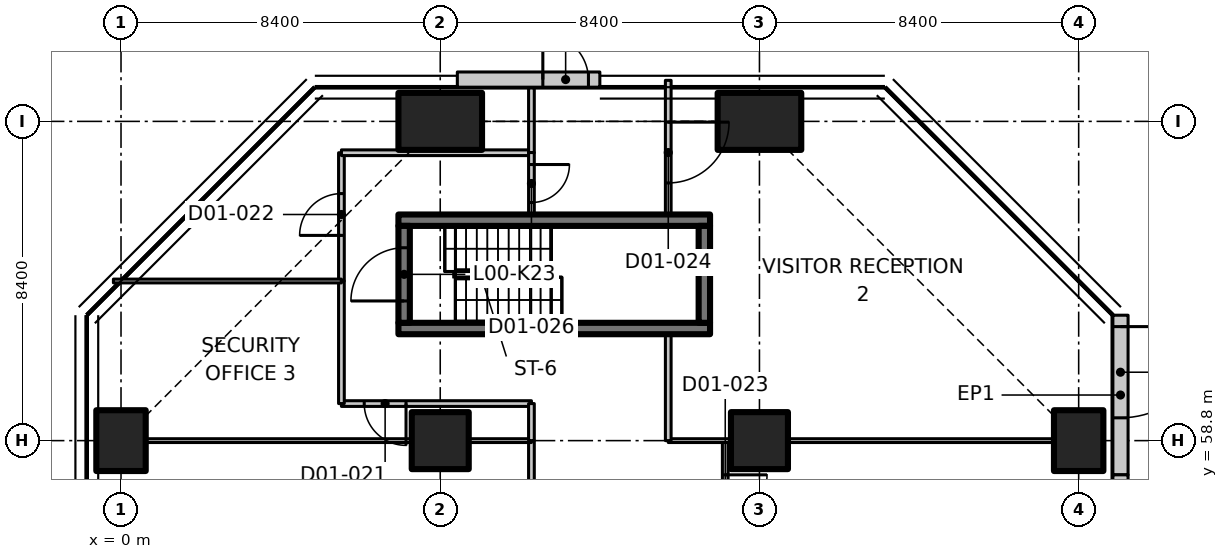
"""IFC4 building model, lengths in metres.
Left out: names, types, materials, properties, quantities, classifications, styles, units other than length and angle.
Written with IfcOpenShell. Run it as: python <this file> out.ifc"""

import sys

from ifc_helpers import new_model, si_unit, direction, frame, frame_2d, origin, origin_2d, place, context, subcontext, project, spatial, polyline, rectangle, outline, extrude, element, fill, save


model = new_model("IFC4")
c1 = context("Model", 3, precision=1e-05, world=origin(), true_north=direction((0.0, 1.0)))
c2 = subcontext(c1, "Body", "Model", "MODEL_VIEW")
j1 = project(units=[si_unit("LENGTHUNIT", "METRE"), si_unit("PLANEANGLEUNIT", "RADIAN")], contexts=[c1])
p1 = place(None, origin())
s1 = spatial("IfcSite", under=j1, at=p1, CompositionType="ELEMENT")
p2 = place(p1, origin())
s2 = spatial("IfcBuilding", under=s1, at=p2, CompositionType="ELEMENT")
p3 = place(p2, origin())
s3 = spatial("IfcBuildingStorey", under=s2, at=p3, CompositionType="ELEMENT", Elevation=0.0)
p4 = place(p3, frame((0.0, 58.8, 0.0), z_axis=(0.0, 0.0, 1.0), x_axis=(1.0, 0.0, 0.0)))
e1 = element("IfcColumn", 1, at=p4, inside=s3, PredefinedType="COLUMN", context=c2, shape_type="SweptSolid", body=[
    extrude(rectangle(XDim=1.3, YDim=1.6, at=origin_2d()), origin(), (0.0, 0.0, 1.0), 6.75),
])
p5 = place(p3, frame((8.4, 58.8, 0.0), z_axis=(0.0, 0.0, 1.0), x_axis=(1.0, 0.0, 0.0)))
e2 = element("IfcColumn", 2, at=p5, inside=s3, PredefinedType="COLUMN", context=c2, shape_type="SweptSolid", body=[
    extrude(rectangle(XDim=1.5, YDim=1.5, at=origin_2d()), origin(), (0.0, 0.0, 1.0), 6.75),
])
p6 = place(p3, frame((8.4, 67.2, 0.0), z_axis=(0.0, 0.0, 1.0), x_axis=(0.0, 1.0, 0.0)))
e3 = element("IfcColumn", 3, at=p6, inside=s3, PredefinedType="COLUMN", context=c2, shape_type="SweptSolid", body=[
    extrude(rectangle(XDim=1.5, YDim=2.2, at=origin_2d()), origin(), (0.0, 0.0, 1.0), 6.75),
])
p7 = place(p3, frame((16.8, 58.8, 0.0), z_axis=(0.0, 0.0, 1.0), x_axis=(1.0, 0.0, 0.0)))
e4 = element("IfcColumn", 4, at=p7, inside=s3, PredefinedType="COLUMN", context=c2, shape_type="SweptSolid", body=[
    extrude(rectangle(XDim=1.5, YDim=1.5, at=origin_2d()), origin(), (0.0, 0.0, 1.0), 6.75),
])
p8 = place(p3, frame((16.8, 67.2, 0.0), z_axis=(0.0, 0.0, 1.0), x_axis=(0.0, 1.0, 0.0)))
e5 = element("IfcColumn", 5, at=p8, inside=s3, PredefinedType="COLUMN", context=c2, shape_type="SweptSolid", body=[
    extrude(rectangle(XDim=1.5, YDim=2.2, at=origin_2d()), origin(), (0.0, 0.0, 1.0), 6.75),
])
p9 = place(p3, frame((25.2, 58.8, 0.0), z_axis=(0.0, 0.0, 1.0), x_axis=(1.0, 0.0, 0.0)))
e6 = element("IfcColumn", 6, at=p9, inside=s3, PredefinedType="COLUMN", context=c2, shape_type="SweptSolid", body=[
    extrude(rectangle(XDim=1.3, YDim=1.6, at=origin_2d()), origin(), (0.0, 0.0, 1.0), 6.75),
])
p10 = place(p3, frame((26.3, 62.1, 0.0), z_axis=(0.0, 0.0, 1.0), x_axis=(0.0, -1.0, 0.0)))
e7 = element("IfcWall", 7, at=p10, inside=s3, PredefinedType="SOLIDWALL", context=c2, shape_type="SweptSolid", body=[
    extrude(rectangle(XDim=4.2, YDim=0.4, at=frame_2d((2.1, 0.0))), origin(), (0.0, 0.0, 1.0), 6.75),
])
p11 = place(p10, frame((0.3, 0.0, 0.0)))
e8 = element("IfcOpeningElement", 8, at=p11, cuts=e7, PredefinedType="OPENING", context=c2, shape_type="SweptSolid", body=[
    extrude(rectangle(XDim=2.4, YDim=2.7, at=frame_2d((1.2, 1.35))), frame((0.0, 0.21, 0.0), z_axis=(0.0, -1.0, 0.0), x_axis=(1.0, 0.0, 0.0)), (0.0, 0.0, 1.0), 0.42),
])
p12 = place(p3, frame((26.3, 57.9, 0.0), z_axis=(0.0, 0.0, 1.0), x_axis=(0.0, -1.0, 0.0)))
e9 = element("IfcWall", 9, at=p12, inside=s3, PredefinedType="SOLIDWALL", context=c2, shape_type="SweptSolid", body=[
    extrude(rectangle(XDim=4.2, YDim=0.4, at=frame_2d((2.1, 0.0))), origin(), (0.0, 0.0, 1.0), 6.75),
])
p13 = place(p12, frame((2.7, 0.0, 0.0)))
e10 = element("IfcOpeningElement", 10, at=p13, cuts=e9, PredefinedType="OPENING", context=c2, shape_type="SweptSolid", body=[
    extrude(rectangle(XDim=1.2, YDim=2.4, at=frame_2d((0.6, 1.2))), frame((0.0, 0.21, 0.0), z_axis=(0.0, -1.0, 0.0), x_axis=(1.0, 0.0, 0.0)), (0.0, 0.0, 1.0), 0.42),
])
p14 = place(p3, frame((8.85, 68.3, 0.0), z_axis=(0.0, 0.0, 1.0), x_axis=(1.0, 0.0, 0.0)))
e11 = element("IfcWall", 11, at=p14, inside=s3, PredefinedType="SOLIDWALL", context=c2, shape_type="SweptSolid", body=[
    extrude(rectangle(XDim=3.75, YDim=0.4, at=frame_2d((1.875, 0.0))), origin(), (0.0, 0.0, 1.0), 6.75),
])
p15 = place(p14, frame((2.25, 0.0, 0.0)))
e12 = element("IfcOpeningElement", 12, at=p15, cuts=e11, PredefinedType="OPENING", context=c2, shape_type="SweptSolid", body=[
    extrude(rectangle(XDim=1.2, YDim=2.4, at=frame_2d((0.6, 1.2))), frame((0.0, 0.21, 0.0), z_axis=(0.0, -1.0, 0.0), x_axis=(1.0, 0.0, 0.0)), (0.0, 0.0, 1.0), 0.42),
])
for number, where, z_axis, x_axis in (
    (13, (7.3, 61.75, 0.0), (0.0, 0.0, 1.0), (1.0, 0.0, 0.0)),
    (14, (7.3, 64.6, 0.0), (0.0, 0.0, 1.0), (1.0, 0.0, 0.0)),
):
    element("IfcWall", number, at=place(p3, frame(where, z_axis=z_axis, x_axis=x_axis)), inside=s3, PredefinedType="SHEAR", context=c2, shape_type="SweptSolid", body=[
        extrude(rectangle(XDim=8.2, YDim=0.3, at=frame_2d((4.1, 0.0))), origin(), (0.0, 0.0, 1.0), 6.75),
    ])
p16 = place(p3, frame((7.45, 61.9, 0.0), z_axis=(0.0, 0.0, 1.0), x_axis=(0.0, 1.0, 0.0)))
e15 = element("IfcWall", 15, at=p16, inside=s3, PredefinedType="SHEAR", context=c2, shape_type="SweptSolid", body=[
    extrude(rectangle(XDim=2.55, YDim=0.3, at=frame_2d((1.275, 0.0))), origin(), (0.0, 0.0, 1.0), 6.75),
])
p17 = place(p16, frame((0.575, 0.0, 0.0)))
e16 = element("IfcOpeningElement", 16, at=p17, cuts=e15, PredefinedType="OPENING", context=c2, shape_type="SweptSolid", body=[
    extrude(rectangle(XDim=1.4, YDim=2.1, at=frame_2d((0.7, 1.05))), frame((0.0, 0.16, 0.0), z_axis=(0.0, -1.0, 0.0), x_axis=(1.0, 0.0, 0.0)), (0.0, 0.0, 1.0), 0.32),
])
p18 = place(p3, frame((15.35, 61.9, 0.0), z_axis=(0.0, 0.0, 1.0), x_axis=(0.0, 1.0, 0.0)))
e17 = element("IfcWall", 17, at=p18, inside=s3, PredefinedType="SHEAR", context=c2, shape_type="SweptSolid", body=[
    extrude(rectangle(XDim=2.55, YDim=0.3, at=frame_2d((1.275, 0.0))), origin(), (0.0, 0.0, 1.0), 6.75),
])
p19 = place(p3, frame((10.8, 56.3, 0.0), z_axis=(0.0, 0.0, 1.0), x_axis=(0.0, 1.0, 0.0)))
e18 = element("IfcWall", 18, at=p19, inside=s3, PredefinedType="PARTITIONING", context=c2, shape_type="SweptSolid", body=[
    extrude(rectangle(XDim=2.5, YDim=0.15, at=frame_2d((1.25, 0.0))), origin(), (0.0, 0.0, 1.0), 6.73),
])
p20 = place(p3, frame((15.9, 58.8, 0.0), z_axis=(0.0, 0.0, 1.0), x_axis=(0.0, -1.0, 0.0)))
e19 = element("IfcWall", 19, at=p20, inside=s3, PredefinedType="PARTITIONING", context=c2, shape_type="SweptSolid", body=[
    extrude(rectangle(XDim=2.65, YDim=0.15, at=frame_2d((1.325, 0.0))), origin(), (0.0, 0.0, 1.0), 6.73),
])
p21 = place(p20, frame((0.9, 0.0, 0.0)))
e20 = element("IfcOpeningElement", 20, at=p21, cuts=e19, PredefinedType="OPENING", context=c2, shape_type="SweptSolid", body=[
    extrude(rectangle(XDim=1.1, YDim=2.1, at=frame_2d((0.55, 1.05))), frame((0.0, 0.085, 0.0), z_axis=(0.0, -1.0, 0.0), x_axis=(1.0, 0.0, 0.0)), (0.0, 0.0, 1.0), 0.17),
])
p22 = place(p3, frame((10.8, 59.775, 0.0), z_axis=(0.0, 0.0, 1.0), x_axis=(-1.0, 0.0, 0.0)))
e21 = element("IfcWall", 21, at=p22, inside=s3, PredefinedType="PARTITIONING", context=c2, shape_type="SweptSolid", body=[
    extrude(rectangle(XDim=5.0, YDim=0.15, at=frame_2d((2.5, 0.0))), origin(), (0.0, 0.0, 1.0), 6.73),
])
p23 = place(p22, frame((3.3, 0.0, 0.0)))
e22 = element("IfcOpeningElement", 22, at=p23, cuts=e21, PredefinedType="OPENING", context=c2, shape_type="SweptSolid", body=[
    extrude(rectangle(XDim=1.1, YDim=2.1, at=frame_2d((0.55, 1.05))), frame((0.0, 0.085, 0.0), z_axis=(0.0, -1.0, 0.0), x_axis=(1.0, 0.0, 0.0)), (0.0, 0.0, 1.0), 0.17),
])
p24 = place(p3, frame((5.8, 59.775, 0.0), z_axis=(0.0, 0.0, 1.0), x_axis=(0.0, 1.0, 0.0)))
e23 = element("IfcWall", 23, at=p24, inside=s3, PredefinedType="PARTITIONING", context=c2, shape_type="SweptSolid", body=[
    extrude(rectangle(XDim=3.225, YDim=0.15, at=frame_2d((1.613, 0.0))), origin(), (0.0, 0.0, 1.0), 6.73),
])
p25 = place(p3, frame((5.8, 63.0, 0.0), z_axis=(0.0, 0.0, 1.0), x_axis=(0.0, 1.0, 0.0)))
e24 = element("IfcWall", 24, at=p25, inside=s3, PredefinedType="PARTITIONING", context=c2, shape_type="SweptSolid", body=[
    extrude(rectangle(XDim=3.375, YDim=0.15, at=frame_2d((1.688, 0.0))), origin(), (0.0, 0.0, 1.0), 6.38),
])
p26 = place(p25, frame((1.2, 0.0, 0.0)))
e25 = element("IfcOpeningElement", 25, at=p26, cuts=e24, PredefinedType="OPENING", context=c2, shape_type="SweptSolid", body=[
    extrude(rectangle(XDim=1.1, YDim=2.1, at=frame_2d((0.55, 1.05))), frame((0.0, 0.085, 0.0), z_axis=(0.0, -1.0, 0.0), x_axis=(1.0, 0.0, 0.0)), (0.0, 0.0, 1.0), 0.17),
])
p27 = place(p3, frame((5.8, 66.375, 0.0), z_axis=(0.0, 0.0, 1.0), x_axis=(1.0, 0.0, 0.0)))
e26 = element("IfcWall", 26, at=p27, inside=s3, PredefinedType="PARTITIONING", context=c2, shape_type="SweptSolid", body=[
    extrude(outline(polyline([(0.0, 0.0), (5.0, 0.0), (5.0, 6.73), (2.466, 6.73), (2.464, 6.38), (1.086, 6.38), (1.084, 6.73), (0.0, 6.73), (0.0, 0.0)])), frame((0.0, 0.075, 0.0), z_axis=(0.0, -1.0, 0.0), x_axis=(1.0, 0.0, 0.0)), (0.0, 0.0, 1.0), 0.15),
])
p28 = place(p3, frame((10.8, 66.375, 0.0), z_axis=(0.0, 0.0, 1.0), x_axis=(0.0, 1.0, 0.0)))
e27 = element("IfcWall", 27, at=p28, inside=s3, PredefinedType="PARTITIONING", context=c2, shape_type="SweptSolid", body=[
    extrude(rectangle(XDim=1.705, YDim=0.15, at=frame_2d((0.853, 0.0))), origin(), (0.0, 0.0, 1.0), 6.38),
])
p29 = place(p3, frame((14.4, 68.28, 0.0), z_axis=(0.0, 0.0, 1.0), x_axis=(0.0, -1.0, 0.0)))
e28 = element("IfcWall", 28, at=p29, inside=s3, PredefinedType="PARTITIONING", context=c2, shape_type="SweptSolid", body=[
    extrude(rectangle(XDim=3.53, YDim=0.15, at=frame_2d((1.765, 0.0))), origin(), (0.0, 0.0, 1.0), 6.38),
])
p30 = place(p29, frame((1.1, 0.0, 0.0)))
e29 = element("IfcOpeningElement", 29, at=p30, cuts=e28, PredefinedType="OPENING", context=c2, shape_type="SweptSolid", body=[
    extrude(rectangle(XDim=1.6, YDim=2.1, at=frame_2d((0.8, 1.05))), frame((0.0, 0.085, 0.0), z_axis=(0.0, -1.0, 0.0), x_axis=(1.0, 0.0, 0.0)), (0.0, 0.0, 1.0), 0.17),
])
p31 = place(p3, frame((0.67, 58.8, 0.0), z_axis=(0.0, 0.0, 1.0), x_axis=(1.0, 0.0, 0.0)))
e30 = element("IfcWall", 30, at=p31, inside=s3, PredefinedType="PARTITIONING", context=c2, shape_type="SweptSolid", body=[
    extrude(rectangle(XDim=6.96, YDim=0.1, at=frame_2d((3.48, 0.0))), origin(), (0.0, 0.0, 1.0), 6.73),
])
p32 = place(p3, frame((9.17, 58.8, 0.0), z_axis=(0.0, 0.0, 1.0), x_axis=(1.0, 0.0, 0.0)))
e31 = element("IfcWall", 31, at=p32, inside=s3, PredefinedType="PARTITIONING", context=c2, shape_type="SweptSolid", body=[
    extrude(rectangle(XDim=1.63, YDim=0.1, at=frame_2d((0.815, 0.0))), origin(), (0.0, 0.0, 1.0), 6.73),
])
p33 = place(p3, frame((-0.2, 63.0, 0.0), z_axis=(0.0, 0.0, 1.0), x_axis=(1.0, 0.0, 0.0)))
e32 = element("IfcWall", 32, at=p33, inside=s3, PredefinedType="PARTITIONING", context=c2, shape_type="SweptSolid", body=[
    extrude(outline(polyline([(0.0, 0.0), (6.0, 0.0), (6.0, 6.73), (5.066, 6.73), (5.064, 6.38), (3.736, 6.38), (3.734, 6.73), (0.0, 6.73), (0.0, 0.0)])), frame((0.0, 0.05, 0.0), z_axis=(0.0, -1.0, 0.0), x_axis=(1.0, 0.0, 0.0)), (0.0, 0.0, 1.0), 0.1),
])
p34 = place(p3, frame((10.8, 59.775, 0.0), z_axis=(0.0, 0.0, 1.0), x_axis=(0.0, -1.0, 0.0)))
e33 = element("IfcWall", 33, at=p34, inside=s3, PredefinedType="PARTITIONING", context=c2, shape_type="SweptSolid", body=[
    extrude(rectangle(XDim=0.975, YDim=0.15, at=frame_2d((0.487, 0.0))), origin(), (0.0, 0.0, 1.0), 6.73),
])
p35 = place(p3, frame((14.4, 58.8, 0.0), z_axis=(0.0, 0.0, 1.0), x_axis=(1.0, 0.0, 0.0)))
e34 = element("IfcWall", 34, at=p35, inside=s3, PredefinedType="PARTITIONING", context=c2, shape_type="SweptSolid", body=[
    extrude(rectangle(XDim=1.63, YDim=0.1, at=frame_2d((0.815, 0.0))), origin(), (0.0, 0.0, 1.0), 6.73),
])
p36 = place(p3, frame((17.57, 58.8, 0.0), z_axis=(0.0, 0.0, 1.0), x_axis=(1.0, 0.0, 0.0)))
e35 = element("IfcWall", 35, at=p36, inside=s3, PredefinedType="PARTITIONING", context=c2, shape_type="SweptSolid", body=[
    extrude(rectangle(XDim=6.96, YDim=0.1, at=frame_2d((3.48, 0.0))), origin(), (0.0, 0.0, 1.0), 6.73),
])
p37 = place(p3, frame((14.4, 58.8, 0.0), z_axis=(0.0, 0.0, 1.0), x_axis=(0.0, 1.0, 0.0)))
e36 = element("IfcWall", 36, at=p37, inside=s3, PredefinedType="PARTITIONING", context=c2, shape_type="SweptSolid", body=[
    extrude(rectangle(XDim=2.8, YDim=0.15, at=frame_2d((1.4, 0.0))), origin(), (0.0, 0.0, 1.0), 6.73),
])
p38 = place(p3, frame((10.8, 66.38, 0.0), z_axis=(0.0, 0.0, 1.0), x_axis=(0.0, -1.0, 0.0)))
e37 = element("IfcWall", 37, at=p38, inside=s3, PredefinedType="PARTITIONING", context=c2, shape_type="SweptSolid", body=[
    extrude(rectangle(XDim=1.63, YDim=0.15, at=frame_2d((0.815, 0.0))), origin(), (0.0, 0.0, 1.0), 6.73),
])
p39 = place(p38, frame((0.315, 0.0, 0.0)))
e38 = element("IfcOpeningElement", 38, at=p39, cuts=e37, PredefinedType="OPENING", context=c2, shape_type="SweptSolid", body=[
    extrude(rectangle(XDim=1.0, YDim=2.1, at=frame_2d((0.5, 1.05))), frame((0.0, 0.085, 0.0), z_axis=(0.0, -1.0, 0.0), x_axis=(1.0, 0.0, 0.0)), (0.0, 0.0, 1.0), 0.17),
])
p40 = place(p11, origin())
e39 = element("IfcDoor", 39, at=p40, inside=s3, OperationType="DOUBLE_DOOR_SINGLE_SWING", PredefinedType="DOOR", context=c2, shape_type="SweptSolid", body=[
    extrude(rectangle(XDim=2.4, YDim=2.7, at=frame_2d((1.2, 1.35))), frame((0.0, 0.025, 0.0), z_axis=(0.0, -1.0, 0.0), x_axis=(1.0, 0.0, 0.0)), (0.0, 0.0, 1.0), 0.05),
])
fill(e8, e39)
p41 = place(p15, origin())
e40 = element("IfcDoor", 40, at=p41, inside=s3, OperationType="SINGLE_SWING_LEFT", PredefinedType="DOOR", context=c2, shape_type="SweptSolid", body=[
    extrude(rectangle(XDim=1.2, YDim=2.4, at=frame_2d((0.6, 1.2))), frame((0.0, 0.025, 0.0), z_axis=(0.0, -1.0, 0.0), x_axis=(1.0, 0.0, 0.0)), (0.0, 0.0, 1.0), 0.05),
])
fill(e12, e40)
p42 = place(p17, origin())
e41 = element("IfcDoor", 41, at=p42, inside=s3, OperationType="SINGLE_SWING_RIGHT", PredefinedType="DOOR", context=c2, shape_type="SweptSolid", body=[
    extrude(rectangle(XDim=1.4, YDim=2.1, at=frame_2d((0.7, 1.05))), frame((0.0, 0.025, 0.0), z_axis=(0.0, -1.0, 0.0), x_axis=(1.0, 0.0, 0.0)), (0.0, 0.0, 1.0), 0.05),
])
fill(e16, e41)
p43 = place(p23, origin())
e42 = element("IfcDoor", 42, at=p43, inside=s3, OperationType="SINGLE_SWING_LEFT", PredefinedType="DOOR", context=c2, shape_type="SweptSolid", body=[
    extrude(rectangle(XDim=1.1, YDim=2.1, at=frame_2d((0.55, 1.05))), frame((0.0, 0.025, 0.0), z_axis=(0.0, -1.0, 0.0), x_axis=(1.0, 0.0, 0.0)), (0.0, 0.0, 1.0), 0.05),
])
fill(e22, e42)
p44 = place(p26, origin())
e43 = element("IfcDoor", 43, at=p44, inside=s3, OperationType="SINGLE_SWING_LEFT", PredefinedType="DOOR", context=c2, shape_type="SweptSolid", body=[
    extrude(rectangle(XDim=1.1, YDim=2.1, at=frame_2d((0.55, 1.05))), frame((0.0, 0.025, 0.0), z_axis=(0.0, -1.0, 0.0), x_axis=(1.0, 0.0, 0.0)), (0.0, 0.0, 1.0), 0.05),
])
fill(e25, e43)
p45 = place(p21, origin())
e44 = element("IfcDoor", 44, at=p45, inside=s3, OperationType="SINGLE_SWING_LEFT", PredefinedType="DOOR", context=c2, shape_type="SweptSolid", body=[
    extrude(rectangle(XDim=1.1, YDim=2.1, at=frame_2d((0.55, 1.05))), frame((0.0, 0.025, 0.0), z_axis=(0.0, -1.0, 0.0), x_axis=(1.0, 0.0, 0.0)), (0.0, 0.0, 1.0), 0.05),
])
fill(e20, e44)
p46 = place(p30, origin())
e45 = element("IfcDoor", 45, at=p46, inside=s3, OperationType="DOUBLE_DOOR_SINGLE_SWING", PredefinedType="DOOR", context=c2, shape_type="SweptSolid", body=[
    extrude(rectangle(XDim=1.6, YDim=2.1, at=frame_2d((0.8, 1.05))), frame((0.0, 0.025, 0.0), z_axis=(0.0, -1.0, 0.0), x_axis=(1.0, 0.0, 0.0)), (0.0, 0.0, 1.0), 0.05),
])
fill(e29, e45)
p47 = place(p39, origin())
e46 = element("IfcDoor", 46, at=p47, inside=s3, OperationType="SINGLE_SWING_RIGHT", PredefinedType="DOOR", context=c2, shape_type="SweptSolid", body=[
    extrude(rectangle(XDim=1.0, YDim=2.1, at=frame_2d((0.5, 1.05))), frame((0.0, 0.025, 0.0), z_axis=(0.0, -1.0, 0.0), x_axis=(1.0, 0.0, 0.0)), (0.0, 0.0, 1.0), 0.05),
])
fill(e38, e46)
save(model, sys.argv[1])
